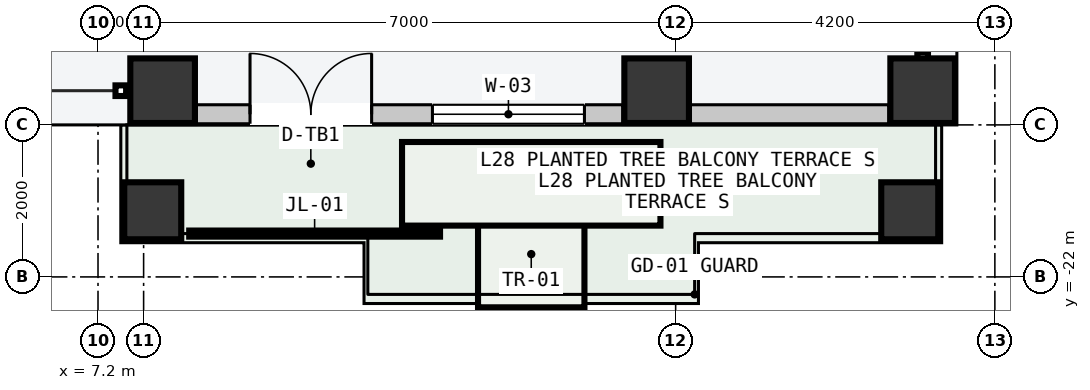
"""IFC4 building model, lengths in metres.
Left out: names, types, materials, properties, quantities, classifications, styles, units other than length and angle.
Written with IfcOpenShell. Run it as: python <this file> out.ifc"""

import sys

from ifc_helpers import new_model, si_unit, direction, frame, frame_2d, origin, origin_2d, place, context, subcontext, project, spatial, rectangle, hollow_rectangle, extrude, element, fill, save


model = new_model("IFC4")
c1 = context("Model", 3, precision=1e-05, world=origin(), true_north=direction((0.0, 1.0)))
c2 = subcontext(c1, "Body", "Model", "MODEL_VIEW")
j1 = project(units=[si_unit("LENGTHUNIT", "METRE"), si_unit("PLANEANGLEUNIT", "RADIAN")], contexts=[c1])
p1 = place(None, origin())
s1 = spatial("IfcSite", under=j1, at=p1, CompositionType="ELEMENT")
p2 = place(p1, origin())
s2 = spatial("IfcBuilding", under=s1, at=p2, CompositionType="ELEMENT")
p3 = place(p2, frame((0.0, 0.0, 109.8)))
s3 = spatial("IfcBuildingStorey", under=s2, at=p3, CompositionType="ELEMENT", Elevation=109.8)
for number, where, z_axis, x_axis in (
    (1, (8.05, -19.55, 0.0), (0.0, 0.0, 1.0), (1.0, 0.0, 0.0)),
    (2, (14.55, -19.55, 0.0), (0.0, 0.0, 1.0), (1.0, 0.0, 0.0)),
    (3, (18.05, -19.55, 0.0), (0.0, 0.0, 1.0), (1.0, 0.0, 0.0)),
):
    element("IfcColumn", number, at=place(p3, frame(where, z_axis=z_axis, x_axis=x_axis)), inside=s3, PredefinedType="COLUMN", context=c2, shape_type="SweptSolid", body=[
        extrude(hollow_rectangle(XDim=0.85, YDim=0.85, WallThickness=0.04, at=origin_2d()), origin(), (0.0, 0.0, 1.0), 3.6),
    ])
for number, where, z_axis, x_axis in (
    (4, (7.92, -21.13, 0.0), (0.0, 0.0, 1.0), (1.0, 0.0, 0.0)),
    (5, (17.88, -21.13, 0.0), (0.0, 0.0, 1.0), (1.0, 0.0, 0.0)),
):
    element("IfcColumn", number, at=place(p3, frame(where, z_axis=z_axis, x_axis=x_axis)), inside=s3, PredefinedType="COLUMN", context=c2, shape_type="SweptSolid", body=[
        extrude(hollow_rectangle(XDim=0.75, YDim=0.75, WallThickness=0.032, at=origin_2d()), origin(), (0.0, 0.0, 1.0), 3.6),
    ])
p4 = place(p3, frame((8.495, -19.86, 0.0), z_axis=(0.0, 0.0, 1.0), x_axis=(1.0, 0.0, 0.0)))
e6 = element("IfcWall", 6, at=p4, inside=s3, PredefinedType="STANDARD", context=c2, shape_type="SweptSolid", body=[
    extrude(rectangle(XDim=5.61, YDim=0.25, at=frame_2d((2.805, 0.0))), origin(), (0.0, 0.0, 1.0), 3.4),
])
p5 = place(p4, frame((0.705, 0.0, 0.0)))
e7 = element("IfcOpeningElement", 7, at=p5, cuts=e6, PredefinedType="OPENING", context=c2, shape_type="SweptSolid", body=[
    extrude(rectangle(XDim=1.6, YDim=2.2, at=frame_2d((0.8, 1.1))), frame((0.0, 0.135, 0.0), z_axis=(0.0, -1.0, 0.0), x_axis=(1.0, 0.0, 0.0)), (0.0, 0.0, 1.0), 0.27),
])
p6 = place(p4, frame((3.105, 0.0, 0.85)))
e8 = element("IfcOpeningElement", 8, at=p6, cuts=e6, PredefinedType="OPENING", context=c2, shape_type="SweptSolid", body=[
    extrude(rectangle(XDim=2.0, YDim=2.1, at=frame_2d((1.0, 1.05))), frame((0.0, 0.135, 0.0), z_axis=(0.0, -1.0, 0.0), x_axis=(1.0, 0.0, 0.0)), (0.0, 0.0, 1.0), 0.27),
])
p7 = place(p3, frame((14.995, -19.86, 0.0), z_axis=(0.0, 0.0, 1.0), x_axis=(1.0, 0.0, 0.0)))
e9 = element("IfcWall", 9, at=p7, inside=s3, PredefinedType="STANDARD", context=c2, shape_type="SweptSolid", body=[
    extrude(rectangle(XDim=2.61, YDim=0.25, at=frame_2d((1.305, 0.0))), origin(), (0.0, 0.0, 1.0), 3.4),
])
p8 = place(p5, origin())
e10 = element("IfcDoor", 10, at=p8, inside=s3, OperationType="DOUBLE_DOOR_SINGLE_SWING", PredefinedType="DOOR", context=c2, shape_type="SweptSolid", body=[
    extrude(rectangle(XDim=1.6, YDim=2.2, at=frame_2d((0.8, 1.1))), frame((0.0, 0.025, 0.0), z_axis=(0.0, -1.0, 0.0), x_axis=(1.0, 0.0, 0.0)), (0.0, 0.0, 1.0), 0.05),
])
fill(e7, e10)
p9 = place(p6, origin())
e11 = element("IfcWindow", 11, at=p9, inside=s3, PartitioningType="SINGLE_PANEL", PredefinedType="WINDOW", context=c2, shape_type="SweptSolid", body=[
    extrude(rectangle(XDim=2.0, YDim=2.1, at=frame_2d((1.0, 1.05))), frame((0.0, 0.03, 0.0), z_axis=(0.0, -1.0, 0.0), x_axis=(1.0, 0.0, 0.0)), (0.0, 0.0, 1.0), 0.06),
])
fill(e8, e11)
save(model, sys.argv[1])
